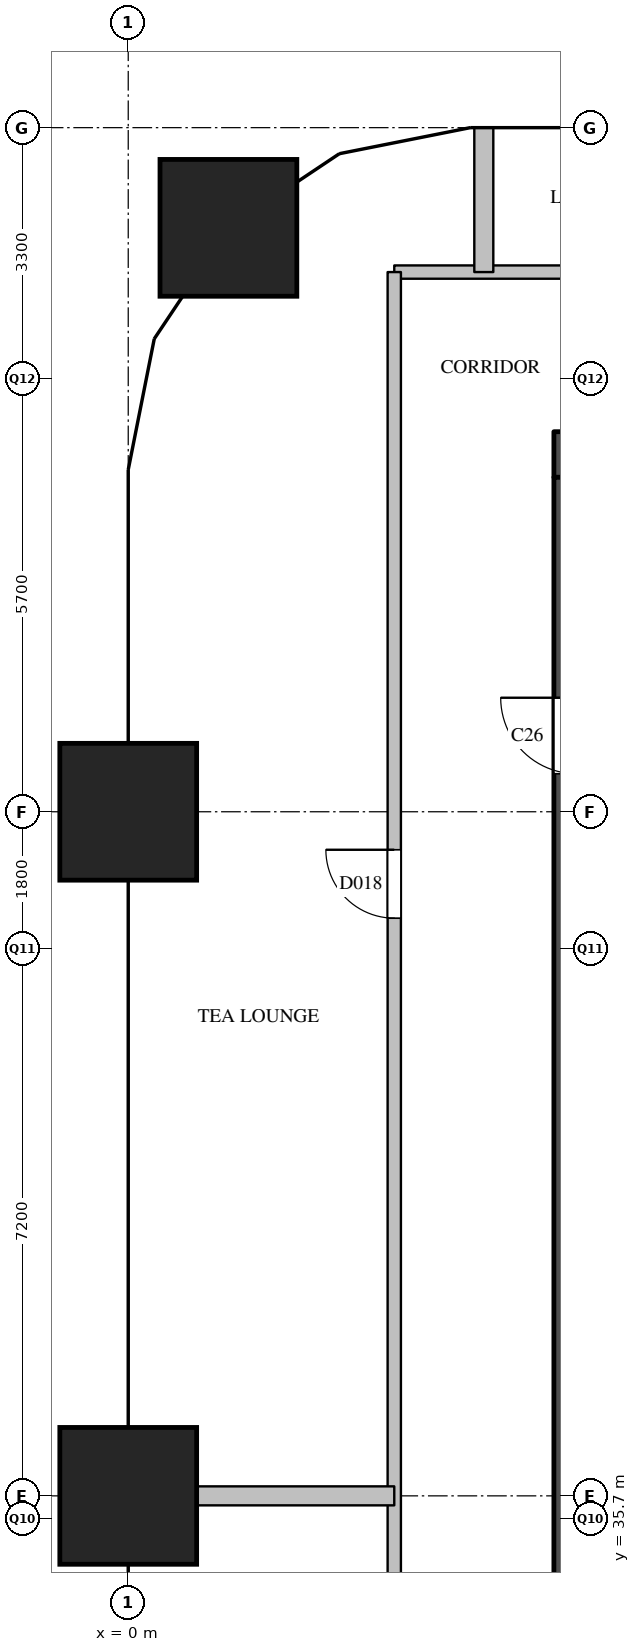
"""IFC4 building model, lengths in metres.
Left out: names, types, materials, properties, quantities, classifications, styles, units other than length and angle.
Written with IfcOpenShell. Run it as: python <this file> out.ifc"""

import sys

from ifc_helpers import new_model, si_unit, direction, frame, frame_2d, origin, origin_2d, place, context, subcontext, project, spatial, rectangle, extrude, element, fill, save


model = new_model("IFC4")
c1 = context("Model", 3, precision=1e-05, world=origin(), true_north=direction((0.0, 1.0)))
c2 = subcontext(c1, "Body", "Model", "MODEL_VIEW")
j1 = project(units=[si_unit("LENGTHUNIT", "METRE"), si_unit("PLANEANGLEUNIT", "RADIAN")], contexts=[c1])
p1 = place(None, origin())
s1 = spatial("IfcSite", under=j1, at=p1, CompositionType="ELEMENT")
p2 = place(p1, origin())
s2 = spatial("IfcBuilding", under=s1, at=p2, CompositionType="ELEMENT")
p3 = place(p2, frame((0.0, 0.0, 93.0)))
s3 = spatial("IfcBuildingStorey", under=s2, at=p3, CompositionType="ELEMENT", Elevation=93.0)
for number, where, z_axis, x_axis in (
    (1, (0.0, 36.0, 0.0), (0.0, 0.0, 1.0), (1.0, 0.0, 0.0)),
    (2, (0.0, 45.0, 0.0), (0.0, 0.0, 1.0), (1.0, 0.0, 0.0)),
    (3, (1.318, 52.682, 0.0), (0.0, 0.0, 1.0), (1.0, 0.0, 0.0)),
):
    element("IfcColumn", number, at=place(p3, frame(where, z_axis=z_axis, x_axis=x_axis)), inside=s3, PredefinedType="COLUMN", context=c2, shape_type="SweptSolid", body=[
        extrude(rectangle(XDim=1.8, YDim=1.8, at=origin_2d()), origin(), (0.0, 0.0, 1.0), 3.8),
    ])
p4 = place(p3, frame((5.6, 49.7, 0.0), z_axis=(0.0, 0.0, 1.0), x_axis=(1.0, 0.0, 0.0)))
e4 = element("IfcWall", 4, at=p4, inside=s3, PredefinedType="SHEAR", context=c2, shape_type="SweptSolid", body=[
    extrude(rectangle(XDim=12.4, YDim=0.6, at=frame_2d((6.2, 0.0))), origin(), (0.0, 0.0, 1.0), 3.5),
])
p5 = place(p3, frame((5.9, 29.1, 0.0), z_axis=(0.0, 0.0, 1.0), x_axis=(0.0, 1.0, 0.0)))
e5 = element("IfcWall", 5, at=p5, inside=s3, PredefinedType="SHEAR", context=c2, shape_type="SweptSolid", body=[
    extrude(rectangle(XDim=20.3, YDim=0.6, at=frame_2d((10.15, 0.0))), origin(), (0.0, 0.0, 1.0), 3.5),
])
p6 = place(p5, frame((3.6, 0.0, 0.0)))
e6 = element("IfcOpeningElement", 6, at=p6, cuts=e5, PredefinedType="OPENING", context=c2, shape_type="SweptSolid", body=[
    extrude(rectangle(XDim=1.8, YDim=2.1, at=frame_2d((0.9, 1.05))), frame((0.0, 0.31, 0.0), z_axis=(0.0, -1.0, 0.0), x_axis=(1.0, 0.0, 0.0)), (0.0, 0.0, 1.0), 0.62),
])
p7 = place(p5, frame((16.4, 0.0, 0.0)))
e7 = element("IfcOpeningElement", 7, at=p7, cuts=e5, PredefinedType="OPENING", context=c2, shape_type="SweptSolid", body=[
    extrude(rectangle(XDim=1.0, YDim=2.1, at=frame_2d((0.5, 1.05))), frame((0.0, 0.31, 0.0), z_axis=(0.0, -1.0, 0.0), x_axis=(1.0, 0.0, 0.0)), (0.0, 0.0, 1.0), 0.62),
])
p8 = place(p3, frame((3.5, 52.1, 0.0), z_axis=(0.0, 0.0, 1.0), x_axis=(1.0, 0.0, 0.0)))
e8 = element("IfcWall", 8, at=p8, inside=s3, PredefinedType="PARTITIONING", context=c2, shape_type="SweptSolid", body=[
    extrude(rectangle(XDim=16.6, YDim=0.175, at=frame_2d((8.3, 0.0))), origin(), (0.0, 0.0, 1.0), 3.5),
])
p9 = place(p8, frame((7.389, 0.0, 0.0)))
e9 = element("IfcOpeningElement", 9, at=p9, cuts=e8, PredefinedType="OPENING", context=c2, shape_type="SweptSolid", body=[
    extrude(rectangle(XDim=0.9, YDim=2.1, at=frame_2d((0.45, 1.05))), frame((0.0, 0.097, 0.0), z_axis=(0.0, -1.0, 0.0), x_axis=(1.0, 0.0, 0.0)), (0.0, 0.0, 1.0), 0.195),
])
p10 = place(p3, frame((3.5, 28.5, 0.0), z_axis=(0.0, 0.0, 1.0), x_axis=(0.0, 1.0, 0.0)))
e10 = element("IfcWall", 10, at=p10, inside=s3, PredefinedType="PARTITIONING", context=c2, shape_type="SweptSolid", body=[
    extrude(rectangle(XDim=23.6, YDim=0.175, at=frame_2d((11.8, 0.0))), origin(), (0.0, 0.0, 1.0), 3.5),
])
p11 = place(p10, frame((3.3, 0.0, 0.0)))
e11 = element("IfcOpeningElement", 11, at=p11, cuts=e10, PredefinedType="OPENING", context=c2, shape_type="SweptSolid", body=[
    extrude(rectangle(XDim=0.9, YDim=2.1, at=frame_2d((0.45, 1.05))), frame((0.0, 0.097, 0.0), z_axis=(0.0, -1.0, 0.0), x_axis=(1.0, 0.0, 0.0)), (0.0, 0.0, 1.0), 0.195),
])
p12 = place(p10, frame((15.1, 0.0, 0.0)))
e12 = element("IfcOpeningElement", 12, at=p12, cuts=e10, PredefinedType="OPENING", context=c2, shape_type="SweptSolid", body=[
    extrude(rectangle(XDim=0.9, YDim=2.1, at=frame_2d((0.45, 1.05))), frame((0.0, 0.097, 0.0), z_axis=(0.0, -1.0, 0.0), x_axis=(1.0, 0.0, 0.0)), (0.0, 0.0, 1.0), 0.195),
])
p13 = place(p3, frame((0.0, 36.0, 0.0), z_axis=(0.0, 0.0, 1.0), x_axis=(1.0, 0.0, 0.0)))
e13 = element("IfcWall", 13, at=p13, inside=s3, PredefinedType="PARTITIONING", context=c2, shape_type="SweptSolid", body=[
    extrude(rectangle(XDim=3.5, YDim=0.25, at=frame_2d((1.75, 0.0))), origin(), (0.0, 0.0, 1.0), 3.5),
])
p14 = place(p3, frame((4.678, 52.1, 0.0), z_axis=(0.0, 0.0, 1.0), x_axis=(0.0, 1.0, 0.0)))
e14 = element("IfcWall", 14, at=p14, inside=s3, PredefinedType="PARTITIONING", context=c2, shape_type="SweptSolid", body=[
    extrude(rectangle(XDim=1.9, YDim=0.25, at=frame_2d((0.95, 0.0))), origin(), (0.0, 0.0, 1.0), 2.5),
])
p15 = place(p12, origin())
e15 = element("IfcDoor", 15, at=p15, inside=s3, OperationType="SINGLE_SWING_RIGHT", PredefinedType="DOOR", context=c2, shape_type="SweptSolid", body=[
    extrude(rectangle(XDim=0.9, YDim=2.1, at=frame_2d((0.45, 1.05))), frame((0.0, 0.025, 0.0), z_axis=(0.0, -1.0, 0.0), x_axis=(1.0, 0.0, 0.0)), (0.0, 0.0, 1.0), 0.05),
])
fill(e12, e15)
save(model, sys.argv[1])
